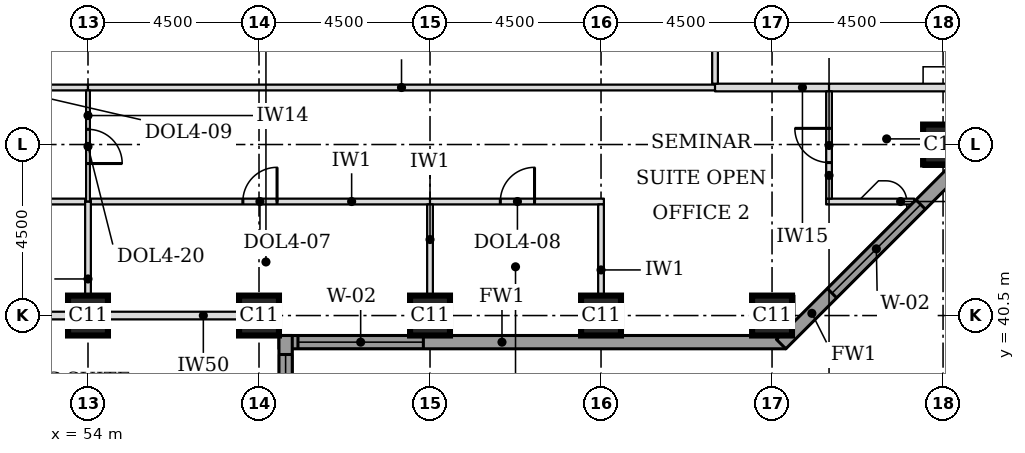
"""IFC4 building model, lengths in metres.
Left out: names, types, materials, properties, quantities, classifications, styles, units other than length and angle.
Written with IfcOpenShell. Run it as: python <this file> out.ifc"""

import sys

from ifc_helpers import new_model, si_unit, direction, frame, frame_2d, origin, origin_2d, place, context, subcontext, project, spatial, rectangle, extrude, element, fill, save


model = new_model("IFC4")
c1 = context("Model", 3, precision=1e-05, world=origin(), true_north=direction((0.0, 1.0)))
c2 = subcontext(c1, "Body", "Model", "MODEL_VIEW")
j1 = project(units=[si_unit("LENGTHUNIT", "METRE"), si_unit("PLANEANGLEUNIT", "RADIAN")], contexts=[c1])
p1 = place(None, origin())
s1 = spatial("IfcSite", under=j1, at=p1, CompositionType="ELEMENT")
p2 = place(p1, origin())
s2 = spatial("IfcBuilding", under=s1, at=p2, CompositionType="ELEMENT")
p3 = place(p2, frame((0.0, 0.0, 101.1)))
s3 = spatial("IfcBuildingStorey", under=s2, at=p3, CompositionType="ELEMENT", Elevation=101.1)
for number, where, z_axis, x_axis in (
    (1, (54.0, 40.5, 0.0), (0.0, 0.0, 1.0), (1.0, 0.0, 0.0)),
    (2, (58.5, 40.5, 0.0), (0.0, 0.0, 1.0), (1.0, 0.0, 0.0)),
    (3, (63.0, 40.5, 0.0), (0.0, 0.0, 1.0), (1.0, 0.0, 0.0)),
    (4, (67.5, 40.5, 0.0), (0.0, 0.0, 1.0), (1.0, 0.0, 0.0)),
    (5, (72.0, 40.5, 0.0), (0.0, 0.0, 1.0), (1.0, 0.0, 0.0)),
    (6, (76.5, 45.0, 0.0), (0.0, 0.0, 1.0), (1.0, 0.0, 0.0)),
):
    element("IfcColumn", number, at=place(p3, frame(where, z_axis=z_axis, x_axis=x_axis)), inside=s3, PredefinedType="COLUMN", context=c2, shape_type="SweptSolid", body=[
        extrude(rectangle(XDim=1.05, YDim=1.05, at=origin_2d()), origin(), (0.0, 0.0, 1.0), 3.7),
    ])
p4 = place(p3, frame((59.025, 39.8, 0.0), z_axis=(0.0, 0.0, 1.0), x_axis=(1.0, 0.0, 0.0)))
e7 = element("IfcWall", 7, at=p4, inside=s3, PredefinedType="STANDARD", context=c2, shape_type="SweptSolid", body=[
    extrude(rectangle(XDim=13.337, YDim=0.35, at=frame_2d((6.669, 0.0))), origin(), (0.0, 0.0, 1.0), 3.525),
])
p5 = place(p4, frame((0.5, 0.0, 0.9)))
e8 = element("IfcOpeningElement", 8, at=p5, cuts=e7, PredefinedType="OPENING", context=c2, shape_type="SweptSolid", body=[
    extrude(rectangle(XDim=3.3, YDim=1.9, at=frame_2d((1.65, 0.95))), frame((0.0, 0.185, 0.0), z_axis=(0.0, -1.0, 0.0), x_axis=(1.0, 0.0, 0.0)), (0.0, 0.0, 1.0), 0.37),
])
p6 = place(p3, frame((72.239, 39.749, 0.0), z_axis=(0.0, 0.0, 1.0), x_axis=(0.707106781187, 0.707106781187, 0.0)))
e9 = element("IfcWall", 9, at=p6, inside=s3, PredefinedType="STANDARD", context=c2, shape_type="SweptSolid", body=[
    extrude(rectangle(XDim=7.089, YDim=0.35, at=frame_2d((3.544, 0.0))), origin(), (0.0, 0.0, 1.0), 3.525),
])
p7 = place(p6, frame((1.894, 0.0, 0.9)))
e10 = element("IfcOpeningElement", 10, at=p7, cuts=e9, PredefinedType="OPENING", context=c2, shape_type="SweptSolid", body=[
    extrude(rectangle(XDim=3.3, YDim=1.9, at=frame_2d((1.65, 0.95))), frame((0.0, 0.185, 0.0), z_axis=(0.0, -1.0, 0.0), x_axis=(1.0, 0.0, 0.0)), (0.0, 0.0, 1.0), 0.37),
])
p8 = place(p3, frame((59.2, 22.138, 0.0), z_axis=(0.0, 0.0, 1.0), x_axis=(0.0, 1.0, 0.0)))
e11 = element("IfcWall", 11, at=p8, inside=s3, PredefinedType="STANDARD", context=c2, shape_type="SweptSolid", body=[
    extrude(rectangle(XDim=17.837, YDim=0.35, at=frame_2d((8.919, 0.0))), origin(), (0.0, 0.0, 1.0), 3.525),
])
p9 = place(p8, frame((5.462, 0.0, 0.9)))
e12 = element("IfcOpeningElement", 12, at=p9, cuts=e11, PredefinedType="OPENING", context=c2, shape_type="SweptSolid", body=[
    extrude(rectangle(XDim=3.3, YDim=1.9, at=frame_2d((1.65, 0.95))), frame((0.0, 0.185, 0.0), z_axis=(0.0, -1.0, 0.0), x_axis=(1.0, 0.0, 0.0)), (0.0, 0.0, 1.0), 0.37),
])
p10 = place(p8, frame((14.037, 0.0, 0.9)))
e13 = element("IfcOpeningElement", 13, at=p10, cuts=e11, PredefinedType="OPENING", context=c2, shape_type="SweptSolid", body=[
    extrude(rectangle(XDim=3.3, YDim=1.9, at=frame_2d((1.65, 0.95))), frame((0.0, 0.185, 0.0), z_axis=(0.0, -1.0, 0.0), x_axis=(1.0, 0.0, 0.0)), (0.0, 0.0, 1.0), 0.37),
])
p11 = place(p3, frame((50.015, 40.5, 0.0), z_axis=(0.0, 0.0, 1.0), x_axis=(1.0, 0.0, 0.0)))
e14 = element("IfcWall", 14, at=p11, inside=s3, PredefinedType="PARTITIONING", context=c2, shape_type="SweptSolid", body=[
    extrude(rectangle(XDim=3.46, YDim=0.2, at=frame_2d((1.73, 0.0))), origin(), (0.0, 0.0, 1.0), 2.8),
])
p12 = place(p3, frame((54.495, 40.5, 0.0), z_axis=(0.0, 0.0, 1.0), x_axis=(1.0, 0.0, 0.0)))
e15 = element("IfcWall", 15, at=p12, inside=s3, PredefinedType="PARTITIONING", context=c2, shape_type="SweptSolid", body=[
    extrude(rectangle(XDim=3.48, YDim=0.2, at=frame_2d((1.74, 0.0))), origin(), (0.0, 0.0, 1.0), 2.8),
])
p13 = place(p3, frame((49.575, 43.5, 0.0), z_axis=(0.0, 0.0, 1.0), x_axis=(1.0, 0.0, 0.0)))
e16 = element("IfcWall", 16, at=p13, inside=s3, PredefinedType="PARTITIONING", context=c2, shape_type="SweptSolid", body=[
    extrude(rectangle(XDim=4.35, YDim=0.15, at=frame_2d((2.175, 0.0))), origin(), (0.0, 0.0, 1.0), 3.55),
])
p14 = place(p13, frame((1.7, 0.0, 0.0)))
e17 = element("IfcOpeningElement", 17, at=p14, cuts=e16, PredefinedType="OPENING", context=c2, shape_type="SweptSolid", body=[
    extrude(rectangle(XDim=0.9, YDim=2.1, at=frame_2d((0.45, 1.05))), frame((0.0, 0.085, 0.0), z_axis=(0.0, -1.0, 0.0), x_axis=(1.0, 0.0, 0.0)), (0.0, 0.0, 1.0), 0.17),
])
p15 = place(p3, frame((54.075, 43.5, 0.0), z_axis=(0.0, 0.0, 1.0), x_axis=(1.0, 0.0, 0.0)))
e18 = element("IfcWall", 18, at=p15, inside=s3, PredefinedType="PARTITIONING", context=c2, shape_type="SweptSolid", body=[
    extrude(rectangle(XDim=8.925, YDim=0.15, at=frame_2d((4.462, 0.0))), origin(), (0.0, 0.0, 1.0), 3.55),
])
p16 = place(p15, frame((4.0, 0.0, 0.0)))
e19 = element("IfcOpeningElement", 19, at=p16, cuts=e18, PredefinedType="OPENING", context=c2, shape_type="SweptSolid", body=[
    extrude(rectangle(XDim=0.9, YDim=2.1, at=frame_2d((0.45, 1.05))), frame((0.0, 0.085, 0.0), z_axis=(0.0, -1.0, 0.0), x_axis=(1.0, 0.0, 0.0)), (0.0, 0.0, 1.0), 0.17),
])
p17 = place(p3, frame((63.0, 43.5, 0.0), z_axis=(0.0, 0.0, 1.0), x_axis=(1.0, 0.0, 0.0)))
e20 = element("IfcWall", 20, at=p17, inside=s3, PredefinedType="PARTITIONING", context=c2, shape_type="SweptSolid", body=[
    extrude(rectangle(XDim=4.575, YDim=0.15, at=frame_2d((2.288, 0.0))), origin(), (0.0, 0.0, 1.0), 3.55),
])
p18 = place(p17, frame((1.85, 0.0, 0.0)))
e21 = element("IfcOpeningElement", 21, at=p18, cuts=e20, PredefinedType="OPENING", context=c2, shape_type="SweptSolid", body=[
    extrude(rectangle(XDim=0.9, YDim=2.1, at=frame_2d((0.45, 1.05))), frame((0.0, 0.085, 0.0), z_axis=(0.0, -1.0, 0.0), x_axis=(1.0, 0.0, 0.0)), (0.0, 0.0, 1.0), 0.17),
])
p19 = place(p3, frame((73.425, 43.5, 0.0), z_axis=(0.0, 0.0, 1.0), x_axis=(1.0, 0.0, 0.0)))
e22 = element("IfcWall", 22, at=p19, inside=s3, PredefinedType="PARTITIONING", context=c2, shape_type="SweptSolid", body=[
    extrude(rectangle(XDim=2.317, YDim=0.15, at=frame_2d((1.159, 0.0))), origin(), (0.0, 0.0, 1.0), 3.55),
])
p20 = place(p3, frame((49.425, 46.5, 0.0), z_axis=(0.0, 0.0, 1.0), x_axis=(1.0, 0.0, 0.0)))
e23 = element("IfcWall", 23, at=p20, inside=s3, PredefinedType="PARTITIONING", context=c2, shape_type="SweptSolid", body=[
    extrude(rectangle(XDim=4.575, YDim=0.15, at=frame_2d((2.288, 0.0))), origin(), (0.0, 0.0, 1.0), 3.55),
])
p21 = place(p20, frame((1.8, 0.0, 0.0)))
e24 = element("IfcOpeningElement", 24, at=p21, cuts=e23, PredefinedType="OPENING", context=c2, shape_type="SweptSolid", body=[
    extrude(rectangle(XDim=1.0, YDim=2.1, at=frame_2d((0.5, 1.05))), frame((0.0, 0.085, 0.0), z_axis=(0.0, -1.0, 0.0), x_axis=(1.0, 0.0, 0.0)), (0.0, 0.0, 1.0), 0.17),
])
p22 = place(p3, frame((54.0, 46.5, 0.0), z_axis=(0.0, 0.0, 1.0), x_axis=(1.0, 0.0, 0.0)))
e25 = element("IfcWall", 25, at=p22, inside=s3, PredefinedType="PARTITIONING", context=c2, shape_type="SweptSolid", body=[
    extrude(rectangle(XDim=16.5, YDim=0.15, at=frame_2d((8.25, 0.0))), origin(), (0.0, 0.0, 1.0), 3.55),
])
p23 = place(p3, frame((70.5, 46.5, 0.0), z_axis=(0.0, 0.0, 1.0), x_axis=(1.0, 0.0, 0.0)))
e26 = element("IfcWall", 26, at=p23, inside=s3, PredefinedType="PARTITIONING", context=c2, shape_type="SweptSolid", body=[
    extrude(rectangle(XDim=3.0, YDim=0.2, at=frame_2d((1.5, 0.0))), origin(), (0.0, 0.0, 1.0), 3.55),
])
p24 = place(p3, frame((73.5, 46.5, 0.0), z_axis=(0.0, 0.0, 1.0), x_axis=(1.0, 0.0, 0.0)))
e27 = element("IfcWall", 27, at=p24, inside=s3, PredefinedType="PARTITIONING", context=c2, shape_type="SweptSolid", body=[
    extrude(rectangle(XDim=3.525, YDim=0.2, at=frame_2d((1.762, 0.0))), origin(), (0.0, 0.0, 1.0), 3.55),
])
for number, where, z_axis, x_axis in (
    (28, (63.0, 39.975, 0.0), (0.0, 0.0, 1.0), (0.0, 1.0, 0.0)),
    (29, (67.5, 39.975, 0.0), (0.0, 0.0, 1.0), (0.0, 1.0, 0.0)),
):
    element("IfcWall", number, at=place(p3, frame(where, z_axis=z_axis, x_axis=x_axis)), inside=s3, PredefinedType="PARTITIONING", context=c2, shape_type="SweptSolid", body=[
        extrude(rectangle(XDim=3.45, YDim=0.15, at=frame_2d((1.725, 0.0))), origin(), (0.0, 0.0, 1.0), 3.55),
    ])
p25 = place(p3, frame((54.0, 41.025, 0.0), z_axis=(0.0, 0.0, 1.0), x_axis=(0.0, 1.0, 0.0)))
e30 = element("IfcWall", 30, at=p25, inside=s3, PredefinedType="PARTITIONING", context=c2, shape_type="SweptSolid", body=[
    extrude(rectangle(XDim=2.475, YDim=0.15, at=frame_2d((1.238, 0.0))), origin(), (0.0, 0.0, 1.0), 3.55),
])
p26 = place(p3, frame((54.0, 43.5, 0.0), z_axis=(0.0, 0.0, 1.0), x_axis=(0.0, 1.0, 0.0)))
e31 = element("IfcWall", 31, at=p26, inside=s3, PredefinedType="PARTITIONING", context=c2, shape_type="SweptSolid", body=[
    extrude(rectangle(XDim=2.925, YDim=0.1, at=frame_2d((1.462, 0.0))), origin(), (0.0, 0.0, 1.0), 3.55),
])
p27 = place(p26, frame((1.0, 0.0, 0.0)))
e32 = element("IfcOpeningElement", 32, at=p27, cuts=e31, PredefinedType="OPENING", context=c2, shape_type="SweptSolid", body=[
    extrude(rectangle(XDim=0.9, YDim=2.1, at=frame_2d((0.45, 1.05))), frame((0.0, 0.06, 0.0), z_axis=(0.0, -1.0, 0.0), x_axis=(1.0, 0.0, 0.0)), (0.0, 0.0, 1.0), 0.12),
])
p28 = place(p3, frame((73.5, 43.575, 0.0), z_axis=(0.0, 0.0, 1.0), x_axis=(0.0, 1.0, 0.0)))
e33 = element("IfcWall", 33, at=p28, inside=s3, PredefinedType="PARTITIONING", context=c2, shape_type="SweptSolid", body=[
    extrude(rectangle(XDim=2.825, YDim=0.15, at=frame_2d((1.413, 0.0))), origin(), (0.0, 0.0, 1.0), 3.55),
])
p29 = place(p28, frame((0.95, 0.0, 0.0)))
e34 = element("IfcOpeningElement", 34, at=p29, cuts=e33, PredefinedType="OPENING", context=c2, shape_type="SweptSolid", body=[
    extrude(rectangle(XDim=0.9, YDim=2.1, at=frame_2d((0.45, 1.05))), frame((0.0, 0.085, 0.0), z_axis=(0.0, -1.0, 0.0), x_axis=(1.0, 0.0, 0.0)), (0.0, 0.0, 1.0), 0.17),
])
p30 = place(p3, frame((70.5, 46.6, 0.0), z_axis=(0.0, 0.0, 1.0), x_axis=(0.0, 1.0, 0.0)))
e35 = element("IfcWall", 35, at=p30, inside=s3, PredefinedType="PARTITIONING", context=c2, shape_type="SweptSolid", body=[
    extrude(rectangle(XDim=25.4, YDim=0.15, at=frame_2d((12.7, 0.0))), origin(), (0.0, 0.0, 1.0), 3.55),
])
p31 = place(p30, frame((12.2, 0.0, 0.0)))
e36 = element("IfcOpeningElement", 36, at=p31, cuts=e35, PredefinedType="OPENING", context=c2, shape_type="SweptSolid", body=[
    extrude(rectangle(XDim=1.0, YDim=2.1, at=frame_2d((0.5, 1.05))), frame((0.0, 0.085, 0.0), z_axis=(0.0, -1.0, 0.0), x_axis=(1.0, 0.0, 0.0)), (0.0, 0.0, 1.0), 0.17),
])
p32 = place(p5, origin())
e37 = element("IfcWindow", 37, at=p32, inside=s3, PartitioningType="SINGLE_PANEL", PredefinedType="WINDOW", context=c2, shape_type="SweptSolid", body=[
    extrude(rectangle(XDim=3.3, YDim=1.9, at=frame_2d((1.65, 0.95))), frame((0.0, 0.085, 0.0), z_axis=(0.0, -1.0, 0.0), x_axis=(1.0, 0.0, 0.0)), (0.0, 0.0, 1.0), 0.06),
])
fill(e8, e37)
p33 = place(p7, origin())
e38 = element("IfcWindow", 38, at=p33, inside=s3, PartitioningType="SINGLE_PANEL", PredefinedType="WINDOW", context=c2, shape_type="SweptSolid", body=[
    extrude(rectangle(XDim=3.3, YDim=1.9, at=frame_2d((1.65, 0.95))), frame((0.0, 0.085, 0.0), z_axis=(0.0, -1.0, 0.0), x_axis=(1.0, 0.0, 0.0)), (0.0, 0.0, 1.0), 0.06),
])
fill(e10, e38)
p34 = place(p10, origin())
e39 = element("IfcWindow", 39, at=p34, inside=s3, PartitioningType="SINGLE_PANEL", PredefinedType="WINDOW", context=c2, shape_type="SweptSolid", body=[
    extrude(rectangle(XDim=3.3, YDim=1.9, at=frame_2d((1.65, 0.95))), frame((0.0, 0.085, 0.0), z_axis=(0.0, -1.0, 0.0), x_axis=(1.0, 0.0, 0.0)), (0.0, 0.0, 1.0), 0.06),
])
fill(e13, e39)
p35 = place(p27, frame((0.9, 0.0, 0.0), z_axis=(0.0, 0.0, 1.0), x_axis=(-1.0, 0.0, 0.0)))
e40 = element("IfcDoor", 40, at=p35, inside=s3, OperationType="SINGLE_SWING_RIGHT", PredefinedType="DOOR", context=c2, shape_type="SweptSolid", body=[
    extrude(rectangle(XDim=0.9, YDim=2.1, at=frame_2d((0.45, 1.05))), frame((0.0, 0.025, 0.0), z_axis=(0.0, -1.0, 0.0), x_axis=(1.0, 0.0, 0.0)), (0.0, 0.0, 1.0), 0.05),
])
fill(e32, e40)
p36 = place(p29, origin())
e41 = element("IfcDoor", 41, at=p36, inside=s3, OperationType="SINGLE_SWING_RIGHT", PredefinedType="DOOR", context=c2, shape_type="SweptSolid", body=[
    extrude(rectangle(XDim=0.9, YDim=2.1, at=frame_2d((0.45, 1.05))), frame((0.0, 0.025, 0.0), z_axis=(0.0, -1.0, 0.0), x_axis=(1.0, 0.0, 0.0)), (0.0, 0.0, 1.0), 0.05),
])
fill(e34, e41)
p37 = place(p16, origin())
e42 = element("IfcDoor", 42, at=p37, inside=s3, OperationType="SINGLE_SWING_RIGHT", PredefinedType="DOOR", context=c2, shape_type="SweptSolid", body=[
    extrude(rectangle(XDim=0.9, YDim=2.1, at=frame_2d((0.45, 1.05))), frame((0.0, 0.025, 0.0), z_axis=(0.0, -1.0, 0.0), x_axis=(1.0, 0.0, 0.0)), (0.0, 0.0, 1.0), 0.05),
])
fill(e19, e42)
p38 = place(p18, origin())
e43 = element("IfcDoor", 43, at=p38, inside=s3, OperationType="SINGLE_SWING_RIGHT", PredefinedType="DOOR", context=c2, shape_type="SweptSolid", body=[
    extrude(rectangle(XDim=0.9, YDim=2.1, at=frame_2d((0.45, 1.05))), frame((0.0, 0.025, 0.0), z_axis=(0.0, -1.0, 0.0), x_axis=(1.0, 0.0, 0.0)), (0.0, 0.0, 1.0), 0.05),
])
fill(e21, e43)
save(model, sys.argv[1])
